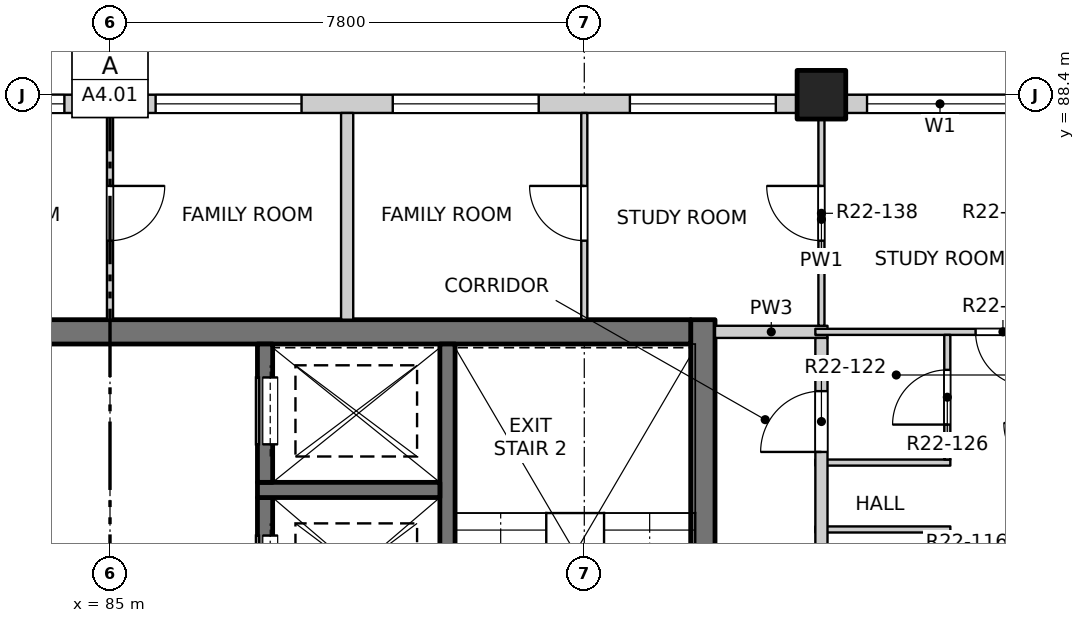
"""IFC4 building model, lengths in metres.
Left out: names, types, materials, properties, quantities, classifications, styles, units other than length and angle.
Written with IfcOpenShell. Run it as: python <this file> out.ifc"""

import sys

from ifc_helpers import new_model, si_unit, direction, frame, frame_2d, origin, origin_2d, place, context, subcontext, project, spatial, rectangle, extrude, element, fill, save


model = new_model("IFC4")
c1 = context("Model", 3, precision=1e-05, world=origin(), true_north=direction((0.0, 1.0)))
c2 = subcontext(c1, "Body", "Model", "MODEL_VIEW")
j1 = project(units=[si_unit("LENGTHUNIT", "METRE"), si_unit("PLANEANGLEUNIT", "RADIAN")], contexts=[c1])
p1 = place(None, origin())
s1 = spatial("IfcSite", under=j1, at=p1, CompositionType="ELEMENT")
p2 = place(p1, origin())
s2 = spatial("IfcBuilding", under=s1, at=p2, CompositionType="ELEMENT")
p3 = place(p2, frame((0.0, 0.0, 224.5)))
s3 = spatial("IfcBuildingStorey", under=s2, at=p3, CompositionType="ELEMENT", Elevation=224.5)
p4 = place(p3, frame((96.7, 88.4, -0.25), z_axis=(0.0, 0.0, 1.0), x_axis=(1.0, 0.0, 0.0)))
e1 = element("IfcColumn", 1, at=p4, inside=s3, PredefinedType="COLUMN", context=c2, shape_type="SweptSolid", body=[
    extrude(rectangle(XDim=0.8, YDim=0.8, at=origin_2d()), origin(), (0.0, 0.0, 1.0), 3.4),
])
p5 = place(p3, frame((94.75, 77.3, -0.25), z_axis=(0.0, 0.0, 1.0), x_axis=(0.0, 1.0, 0.0)))
e2 = element("IfcWall", 2, at=p5, inside=s3, PredefinedType="SOLIDWALL", context=c2, shape_type="SweptSolid", body=[
    extrude(rectangle(XDim=7.4, YDim=0.4, at=frame_2d((3.7, 0.0))), origin(), (0.0, 0.0, 1.0), 3.4),
])
p6 = place(p5, frame((0.3, 0.0, 0.25)))
e3 = element("IfcOpeningElement", 3, at=p6, cuts=e2, PredefinedType="OPENING", context=c2, shape_type="SweptSolid", body=[
    extrude(rectangle(XDim=1.2, YDim=2.1, at=frame_2d((0.6, 1.05))), frame((0.0, 0.21, 0.0), z_axis=(0.0, -1.0, 0.0), x_axis=(1.0, 0.0, 0.0)), (0.0, 0.0, 1.0), 0.42),
])
p7 = place(p3, frame((75.45, 84.5, -0.25), z_axis=(0.0, 0.0, 1.0), x_axis=(1.0, 0.0, 0.0)))
e4 = element("IfcWall", 4, at=p7, inside=s3, PredefinedType="SOLIDWALL", context=c2, shape_type="SweptSolid", body=[
    extrude(rectangle(XDim=19.1, YDim=0.4, at=frame_2d((9.55, 0.0))), origin(), (0.0, 0.0, 1.0), 3.4),
])
p8 = place(p3, frame((90.55, 77.3, -0.25), z_axis=(0.0, 0.0, 1.0), x_axis=(0.0, 1.0, 0.0)))
e5 = element("IfcWall", 5, at=p8, inside=s3, PredefinedType="SOLIDWALL", context=c2, shape_type="SweptSolid", body=[
    extrude(rectangle(XDim=7.0, YDim=0.25, at=frame_2d((3.5, 0.0))), origin(), (0.0, 0.0, 1.0), 3.4),
])
p9 = place(p3, frame((87.55, 79.425, -0.25), z_axis=(0.0, 0.0, 1.0), x_axis=(0.0, 1.0, 0.0)))
e6 = element("IfcWall", 6, at=p9, inside=s3, PredefinedType="SOLIDWALL", context=c2, shape_type="SweptSolid", body=[
    extrude(rectangle(XDim=2.35, YDim=0.25, at=frame_2d((1.175, 0.0))), origin(), (0.0, 0.0, 1.0), 3.4),
])
p10 = place(p9, frame((0.625, 0.0, 0.25)))
e7 = element("IfcOpeningElement", 7, at=p10, cuts=e6, PredefinedType="OPENING", context=c2, shape_type="SweptSolid", body=[
    extrude(rectangle(XDim=1.1, YDim=2.1, at=frame_2d((0.55, 1.05))), frame((0.0, 0.135, 0.0), z_axis=(0.0, -1.0, 0.0), x_axis=(1.0, 0.0, 0.0)), (0.0, 0.0, 1.0), 0.27),
])
p11 = place(p3, frame((87.425, 81.9, -0.25), z_axis=(0.0, 0.0, 1.0), x_axis=(1.0, 0.0, 0.0)))
e8 = element("IfcWall", 8, at=p11, inside=s3, PredefinedType="SOLIDWALL", context=c2, shape_type="SweptSolid", body=[
    extrude(rectangle(XDim=3.0, YDim=0.25, at=frame_2d((1.5, 0.0))), origin(), (0.0, 0.0, 1.0), 3.4),
])
p12 = place(p3, frame((87.55, 82.025, -0.25), z_axis=(0.0, 0.0, 1.0), x_axis=(0.0, 1.0, 0.0)))
e9 = element("IfcWall", 9, at=p12, inside=s3, PredefinedType="SOLIDWALL", context=c2, shape_type="SweptSolid", body=[
    extrude(rectangle(XDim=2.275, YDim=0.25, at=frame_2d((1.138, 0.0))), origin(), (0.0, 0.0, 1.0), 3.4),
])
p13 = place(p12, frame((0.625, 0.0, 0.25)))
e10 = element("IfcOpeningElement", 10, at=p13, cuts=e9, PredefinedType="OPENING", context=c2, shape_type="SweptSolid", body=[
    extrude(rectangle(XDim=1.1, YDim=2.1, at=frame_2d((0.55, 1.05))), frame((0.0, 0.135, 0.0), z_axis=(0.0, -1.0, 0.0), x_axis=(1.0, 0.0, 0.0)), (0.0, 0.0, 1.0), 0.27),
])
p14 = place(p3, frame((73.7, 88.25, 0.0), z_axis=(0.0, 0.0, 1.0), x_axis=(1.0, 0.0, 0.0)))
e11 = element("IfcWall", 11, at=p14, inside=s3, PredefinedType="SOLIDWALL", context=c2, shape_type="SweptSolid", body=[
    extrude(rectangle(XDim=22.6, YDim=0.3, at=frame_2d((11.3, 0.0))), origin(), (0.0, 0.0, 1.0), 2.7),
])
p15 = place(p14, frame((0.35, 0.0, 0.9)))
e12 = element("IfcOpeningElement", 12, at=p15, cuts=e11, PredefinedType="OPENING", context=c2, shape_type="SweptSolid", body=[
    extrude(rectangle(XDim=2.4, YDim=1.8, at=frame_2d((1.2, 0.9))), frame((0.0, 0.16, 0.0), z_axis=(0.0, -1.0, 0.0), x_axis=(1.0, 0.0, 0.0)), (0.0, 0.0, 1.0), 0.32),
])
p16 = place(p14, frame((4.25, 0.0, 0.9)))
e13 = element("IfcOpeningElement", 13, at=p16, cuts=e11, PredefinedType="OPENING", context=c2, shape_type="SweptSolid", body=[
    extrude(rectangle(XDim=2.4, YDim=1.8, at=frame_2d((1.2, 0.9))), frame((0.0, 0.16, 0.0), z_axis=(0.0, -1.0, 0.0), x_axis=(1.0, 0.0, 0.0)), (0.0, 0.0, 1.0), 0.32),
])
p17 = place(p14, frame((8.15, 0.0, 0.9)))
e14 = element("IfcOpeningElement", 14, at=p17, cuts=e11, PredefinedType="OPENING", context=c2, shape_type="SweptSolid", body=[
    extrude(rectangle(XDim=2.4, YDim=1.8, at=frame_2d((1.2, 0.9))), frame((0.0, 0.16, 0.0), z_axis=(0.0, -1.0, 0.0), x_axis=(1.0, 0.0, 0.0)), (0.0, 0.0, 1.0), 0.32),
])
p18 = place(p14, frame((12.05, 0.0, 0.9)))
e15 = element("IfcOpeningElement", 15, at=p18, cuts=e11, PredefinedType="OPENING", context=c2, shape_type="SweptSolid", body=[
    extrude(rectangle(XDim=2.4, YDim=1.8, at=frame_2d((1.2, 0.9))), frame((0.0, 0.16, 0.0), z_axis=(0.0, -1.0, 0.0), x_axis=(1.0, 0.0, 0.0)), (0.0, 0.0, 1.0), 0.32),
])
p19 = place(p14, frame((15.95, 0.0, 0.9)))
e16 = element("IfcOpeningElement", 16, at=p19, cuts=e11, PredefinedType="OPENING", context=c2, shape_type="SweptSolid", body=[
    extrude(rectangle(XDim=2.4, YDim=1.8, at=frame_2d((1.2, 0.9))), frame((0.0, 0.16, 0.0), z_axis=(0.0, -1.0, 0.0), x_axis=(1.0, 0.0, 0.0)), (0.0, 0.0, 1.0), 0.32),
])
p20 = place(p14, frame((19.85, 0.0, 0.9)))
e17 = element("IfcOpeningElement", 17, at=p20, cuts=e11, PredefinedType="OPENING", context=c2, shape_type="SweptSolid", body=[
    extrude(rectangle(XDim=2.4, YDim=1.8, at=frame_2d((1.2, 0.9))), frame((0.0, 0.16, 0.0), z_axis=(0.0, -1.0, 0.0), x_axis=(1.0, 0.0, 0.0)), (0.0, 0.0, 1.0), 0.32),
])
p21 = place(p3, frame((97.1, 88.25, 0.0), z_axis=(0.0, 0.0, 1.0), x_axis=(1.0, 0.0, 0.0)))
e18 = element("IfcWall", 18, at=p21, inside=s3, PredefinedType="SOLIDWALL", context=c2, shape_type="SweptSolid", body=[
    extrude(rectangle(XDim=7.4, YDim=0.3, at=frame_2d((3.7, 0.0))), origin(), (0.0, 0.0, 1.0), 2.7),
])
p22 = place(p21, frame((0.35, 0.0, 0.9)))
e19 = element("IfcOpeningElement", 19, at=p22, cuts=e18, PredefinedType="OPENING", context=c2, shape_type="SweptSolid", body=[
    extrude(rectangle(XDim=2.4, YDim=1.8, at=frame_2d((1.2, 0.9))), frame((0.0, 0.16, 0.0), z_axis=(0.0, -1.0, 0.0), x_axis=(1.0, 0.0, 0.0)), (0.0, 0.0, 1.0), 0.32),
])
p23 = place(p21, frame((4.25, 0.0, 0.9)))
e20 = element("IfcOpeningElement", 20, at=p23, cuts=e18, PredefinedType="OPENING", context=c2, shape_type="SweptSolid", body=[
    extrude(rectangle(XDim=2.4, YDim=1.8, at=frame_2d((1.2, 0.9))), frame((0.0, 0.16, 0.0), z_axis=(0.0, -1.0, 0.0), x_axis=(1.0, 0.0, 0.0)), (0.0, 0.0, 1.0), 0.32),
])
for number, where, z_axis, x_axis in (
    (21, (96.6, 81.25, 0.0), (0.0, 0.0, 1.0), (1.0, 0.0, 0.0)),
    (22, (96.6, 82.35, 0.0), (0.0, 0.0, 1.0), (1.0, 0.0, 0.0)),
):
    element("IfcWall", number, at=place(p3, frame(where, z_axis=z_axis, x_axis=x_axis)), inside=s3, PredefinedType="PARTITIONING", context=c2, shape_type="SweptSolid", body=[
        extrude(rectangle(XDim=2.22, YDim=0.1, at=frame_2d((1.11, 0.0))), origin(), (0.0, 0.0, 1.0), 3.15),
    ])
p24 = place(p3, frame((94.95, 84.5, 0.0), z_axis=(0.0, 0.0, 1.0), x_axis=(1.0, 0.0, 0.0)))
e23 = element("IfcWall", 23, at=p24, inside=s3, PredefinedType="PARTITIONING", context=c2, shape_type="SweptSolid", body=[
    extrude(rectangle(XDim=1.85, YDim=0.2, at=frame_2d((0.925, 0.0))), origin(), (0.0, 0.0, 1.0), 3.15),
])
p25 = place(p3, frame((96.6, 84.5, 0.0), z_axis=(0.0, 0.0, 1.0), x_axis=(1.0, 0.0, 0.0)))
e24 = element("IfcWall", 24, at=p25, inside=s3, PredefinedType="PARTITIONING", context=c2, shape_type="SweptSolid", body=[
    extrude(rectangle(XDim=11.5, YDim=0.1, at=frame_2d((5.75, 0.0))), origin(), (0.0, 0.0, 1.0), 3.15),
])
p26 = place(p25, frame((2.635, 0.0, 0.0)))
e25 = element("IfcOpeningElement", 25, at=p26, cuts=e24, PredefinedType="OPENING", context=c2, shape_type="SweptSolid", body=[
    extrude(rectangle(XDim=0.9, YDim=2.1, at=frame_2d((0.45, 1.05))), frame((0.0, 0.06, 0.0), z_axis=(0.0, -1.0, 0.0), x_axis=(1.0, 0.0, 0.0)), (0.0, 0.0, 1.0), 0.12),
])
p27 = place(p3, frame((85.0, 84.7, 0.0), z_axis=(0.0, 0.0, 1.0), x_axis=(0.0, 1.0, 0.0)))
e26 = element("IfcWall", 26, at=p27, inside=s3, PredefinedType="PARTITIONING", context=c2, shape_type="SweptSolid", body=[
    extrude(rectangle(XDim=3.4, YDim=0.1, at=frame_2d((1.7, 0.0))), origin(), (0.0, 0.0, 1.0), 3.15),
])
p28 = place(p27, frame((1.3, 0.0, 0.0)))
e27 = element("IfcOpeningElement", 27, at=p28, cuts=e26, PredefinedType="OPENING", context=c2, shape_type="SweptSolid", body=[
    extrude(rectangle(XDim=0.9, YDim=2.1, at=frame_2d((0.45, 1.05))), frame((0.0, 0.06, 0.0), z_axis=(0.0, -1.0, 0.0), x_axis=(1.0, 0.0, 0.0)), (0.0, 0.0, 1.0), 0.12),
])
p29 = place(p3, frame((88.9, 84.7, 0.0), z_axis=(0.0, 0.0, 1.0), x_axis=(0.0, 1.0, 0.0)))
e28 = element("IfcWall", 28, at=p29, inside=s3, PredefinedType="PARTITIONING", context=c2, shape_type="SweptSolid", body=[
    extrude(rectangle(XDim=3.4, YDim=0.2, at=frame_2d((1.7, 0.0))), origin(), (0.0, 0.0, 1.0), 3.15),
])
p30 = place(p3, frame((92.8, 84.7, 0.0), z_axis=(0.0, 0.0, 1.0), x_axis=(0.0, 1.0, 0.0)))
e29 = element("IfcWall", 29, at=p30, inside=s3, PredefinedType="PARTITIONING", context=c2, shape_type="SweptSolid", body=[
    extrude(rectangle(XDim=3.4, YDim=0.1, at=frame_2d((1.7, 0.0))), origin(), (0.0, 0.0, 1.0), 3.15),
])
p31 = place(p30, frame((1.3, 0.0, 0.0)))
e30 = element("IfcOpeningElement", 30, at=p31, cuts=e29, PredefinedType="OPENING", context=c2, shape_type="SweptSolid", body=[
    extrude(rectangle(XDim=0.9, YDim=2.1, at=frame_2d((0.45, 1.05))), frame((0.0, 0.06, 0.0), z_axis=(0.0, -1.0, 0.0), x_axis=(1.0, 0.0, 0.0)), (0.0, 0.0, 1.0), 0.12),
])
p32 = place(p3, frame((96.7, 49.5, 0.0), z_axis=(0.0, 0.0, 1.0), x_axis=(0.0, 1.0, 0.0)))
e31 = element("IfcWall", 31, at=p32, inside=s3, PredefinedType="PARTITIONING", context=c2, shape_type="SweptSolid", body=[
    extrude(rectangle(XDim=34.9, YDim=0.2, at=frame_2d((17.45, 0.0))), origin(), (0.0, 0.0, 1.0), 3.15),
])
p33 = place(p32, frame((9.675, 0.0, 0.0)))
e32 = element("IfcOpeningElement", 32, at=p33, cuts=e31, PredefinedType="OPENING", context=c2, shape_type="SweptSolid", body=[
    extrude(rectangle(XDim=1.0, YDim=2.1, at=frame_2d((0.5, 1.05))), frame((0.0, 0.11, 0.0), z_axis=(0.0, -1.0, 0.0), x_axis=(1.0, 0.0, 0.0)), (0.0, 0.0, 1.0), 0.22),
])
p34 = place(p32, frame((22.925, 0.0, 0.0)))
e33 = element("IfcOpeningElement", 33, at=p34, cuts=e31, PredefinedType="OPENING", context=c2, shape_type="SweptSolid", body=[
    extrude(rectangle(XDim=1.0, YDim=2.1, at=frame_2d((0.5, 1.05))), frame((0.0, 0.11, 0.0), z_axis=(0.0, -1.0, 0.0), x_axis=(1.0, 0.0, 0.0)), (0.0, 0.0, 1.0), 0.22),
])
p35 = place(p32, frame((33.025, 0.0, 0.0)))
e34 = element("IfcOpeningElement", 34, at=p35, cuts=e31, PredefinedType="OPENING", context=c2, shape_type="SweptSolid", body=[
    extrude(rectangle(XDim=1.0, YDim=2.1, at=frame_2d((0.5, 1.05))), frame((0.0, 0.11, 0.0), z_axis=(0.0, -1.0, 0.0), x_axis=(1.0, 0.0, 0.0)), (0.0, 0.0, 1.0), 0.22),
])
p36 = place(p3, frame((96.7, 84.6, 0.0), z_axis=(0.0, 0.0, 1.0), x_axis=(0.0, 1.0, 0.0)))
e35 = element("IfcWall", 35, at=p36, inside=s3, PredefinedType="PARTITIONING", context=c2, shape_type="SweptSolid", body=[
    extrude(rectangle(XDim=3.5, YDim=0.1, at=frame_2d((1.75, 0.0))), origin(), (0.0, 0.0, 1.0), 3.15),
])
p37 = place(p36, frame((1.4, 0.0, 0.0)))
e36 = element("IfcOpeningElement", 36, at=p37, cuts=e35, PredefinedType="OPENING", context=c2, shape_type="SweptSolid", body=[
    extrude(rectangle(XDim=0.9, YDim=2.1, at=frame_2d((0.45, 1.05))), frame((0.0, 0.06, 0.0), z_axis=(0.0, -1.0, 0.0), x_axis=(1.0, 0.0, 0.0)), (0.0, 0.0, 1.0), 0.12),
])
p38 = place(p3, frame((98.77, 72.3, 0.0), z_axis=(0.0, 0.0, 1.0), x_axis=(0.0, 1.0, 0.0)))
e37 = element("IfcWall", 37, at=p38, inside=s3, PredefinedType="PARTITIONING", context=c2, shape_type="SweptSolid", body=[
    extrude(rectangle(XDim=8.9, YDim=0.1, at=frame_2d((4.45, 0.0))), origin(), (0.0, 0.0, 1.0), 3.15),
])
p39 = place(p38, frame((0.54, 0.0, 0.0)))
e38 = element("IfcOpeningElement", 38, at=p39, cuts=e37, PredefinedType="OPENING", context=c2, shape_type="SweptSolid", body=[
    extrude(rectangle(XDim=0.8, YDim=2.1, at=frame_2d((0.4, 1.05))), frame((0.0, 0.06, 0.0), z_axis=(0.0, -1.0, 0.0), x_axis=(1.0, 0.0, 0.0)), (0.0, 0.0, 1.0), 0.12),
])
p40 = place(p38, frame((2.715, 0.0, 0.0)))
e39 = element("IfcOpeningElement", 39, at=p40, cuts=e37, PredefinedType="OPENING", context=c2, shape_type="SweptSolid", body=[
    extrude(rectangle(XDim=0.9, YDim=2.1, at=frame_2d((0.45, 1.05))), frame((0.0, 0.06, 0.0), z_axis=(0.0, -1.0, 0.0), x_axis=(1.0, 0.0, 0.0)), (0.0, 0.0, 1.0), 0.12),
])
p41 = place(p38, frame((5.3, 0.0, 0.0)))
e40 = element("IfcOpeningElement", 40, at=p41, cuts=e37, PredefinedType="OPENING", context=c2, shape_type="SweptSolid", body=[
    extrude(rectangle(XDim=0.9, YDim=2.1, at=frame_2d((0.45, 1.05))), frame((0.0, 0.06, 0.0), z_axis=(0.0, -1.0, 0.0), x_axis=(1.0, 0.0, 0.0)), (0.0, 0.0, 1.0), 0.12),
])
p42 = place(p38, frame((7.625, 0.0, 0.0)))
e41 = element("IfcOpeningElement", 41, at=p42, cuts=e37, PredefinedType="OPENING", context=c2, shape_type="SweptSolid", body=[
    extrude(rectangle(XDim=0.8, YDim=2.1, at=frame_2d((0.4, 1.05))), frame((0.0, 0.06, 0.0), z_axis=(0.0, -1.0, 0.0), x_axis=(1.0, 0.0, 0.0)), (0.0, 0.0, 1.0), 0.12),
])
p43 = place(p3, frame((98.77, 82.4, 0.0), z_axis=(0.0, 0.0, 1.0), x_axis=(0.0, 1.0, 0.0)))
e42 = element("IfcWall", 42, at=p43, inside=s3, PredefinedType="PARTITIONING", context=c2, shape_type="SweptSolid", body=[
    extrude(rectangle(XDim=2.05, YDim=0.1, at=frame_2d((1.025, 0.0))), origin(), (0.0, 0.0, 1.0), 3.15),
])
p44 = place(p43, frame((0.575, 0.0, 0.0)))
e43 = element("IfcOpeningElement", 43, at=p44, cuts=e42, PredefinedType="OPENING", context=c2, shape_type="SweptSolid", body=[
    extrude(rectangle(XDim=0.9, YDim=2.1, at=frame_2d((0.45, 1.05))), frame((0.0, 0.06, 0.0), z_axis=(0.0, -1.0, 0.0), x_axis=(1.0, 0.0, 0.0)), (0.0, 0.0, 1.0), 0.12),
])
p45 = place(p17, origin())
e44 = element("IfcWindow", 44, at=p45, inside=s3, PartitioningType="DOUBLE_PANEL_VERTICAL", PredefinedType="WINDOW", context=c2, shape_type="SweptSolid", body=[
    extrude(rectangle(XDim=2.4, YDim=1.8, at=frame_2d((1.2, 0.9))), frame((0.0, 0.03, 0.0), z_axis=(0.0, -1.0, 0.0), x_axis=(1.0, 0.0, 0.0)), (0.0, 0.0, 1.0), 0.06),
])
fill(e14, e44)
p46 = place(p18, origin())
e45 = element("IfcWindow", 45, at=p46, inside=s3, PartitioningType="DOUBLE_PANEL_VERTICAL", PredefinedType="WINDOW", context=c2, shape_type="SweptSolid", body=[
    extrude(rectangle(XDim=2.4, YDim=1.8, at=frame_2d((1.2, 0.9))), frame((0.0, 0.03, 0.0), z_axis=(0.0, -1.0, 0.0), x_axis=(1.0, 0.0, 0.0)), (0.0, 0.0, 1.0), 0.06),
])
fill(e15, e45)
p47 = place(p19, origin())
e46 = element("IfcWindow", 46, at=p47, inside=s3, PartitioningType="DOUBLE_PANEL_VERTICAL", PredefinedType="WINDOW", context=c2, shape_type="SweptSolid", body=[
    extrude(rectangle(XDim=2.4, YDim=1.8, at=frame_2d((1.2, 0.9))), frame((0.0, 0.03, 0.0), z_axis=(0.0, -1.0, 0.0), x_axis=(1.0, 0.0, 0.0)), (0.0, 0.0, 1.0), 0.06),
])
fill(e16, e46)
p48 = place(p20, origin())
e47 = element("IfcWindow", 47, at=p48, inside=s3, PartitioningType="DOUBLE_PANEL_VERTICAL", PredefinedType="WINDOW", context=c2, shape_type="SweptSolid", body=[
    extrude(rectangle(XDim=2.4, YDim=1.8, at=frame_2d((1.2, 0.9))), frame((0.0, 0.03, 0.0), z_axis=(0.0, -1.0, 0.0), x_axis=(1.0, 0.0, 0.0)), (0.0, 0.0, 1.0), 0.06),
])
fill(e17, e47)
p49 = place(p22, origin())
e48 = element("IfcWindow", 48, at=p49, inside=s3, PartitioningType="DOUBLE_PANEL_VERTICAL", PredefinedType="WINDOW", context=c2, shape_type="SweptSolid", body=[
    extrude(rectangle(XDim=2.4, YDim=1.8, at=frame_2d((1.2, 0.9))), frame((0.0, 0.03, 0.0), z_axis=(0.0, -1.0, 0.0), x_axis=(1.0, 0.0, 0.0)), (0.0, 0.0, 1.0), 0.06),
])
fill(e19, e48)
p50 = place(p10, origin())
e49 = element("IfcDoor", 49, at=p50, inside=s3, OperationType="SLIDING_TO_RIGHT", PredefinedType="DOOR", context=c2, shape_type="SweptSolid", body=[
    extrude(rectangle(XDim=1.1, YDim=2.1, at=frame_2d((0.55, 1.05))), frame((0.0, -0.06, 0.0), z_axis=(0.0, -1.0, 0.0), x_axis=(1.0, 0.0, 0.0)), (0.0, 0.0, 1.0), 0.05),
])
fill(e7, e49)
p51 = place(p35, origin())
e50 = element("IfcDoor", 50, at=p51, inside=s3, OperationType="SINGLE_SWING_LEFT", PredefinedType="DOOR", context=c2, shape_type="SweptSolid", body=[
    extrude(rectangle(XDim=1.0, YDim=2.1, at=frame_2d((0.5, 1.05))), frame((0.0, 0.025, 0.0), z_axis=(0.0, -1.0, 0.0), x_axis=(1.0, 0.0, 0.0)), (0.0, 0.0, 1.0), 0.05),
])
fill(e34, e50)
p52 = place(p13, origin())
e51 = element("IfcDoor", 51, at=p52, inside=s3, OperationType="SLIDING_TO_RIGHT", PredefinedType="DOOR", context=c2, shape_type="SweptSolid", body=[
    extrude(rectangle(XDim=1.1, YDim=2.1, at=frame_2d((0.55, 1.05))), frame((0.0, -0.06, 0.0), z_axis=(0.0, -1.0, 0.0), x_axis=(1.0, 0.0, 0.0)), (0.0, 0.0, 1.0), 0.05),
])
fill(e10, e51)
p53 = place(p44, origin())
e52 = element("IfcDoor", 52, at=p53, inside=s3, OperationType="SINGLE_SWING_LEFT", PredefinedType="DOOR", context=c2, shape_type="SweptSolid", body=[
    extrude(rectangle(XDim=0.9, YDim=2.1, at=frame_2d((0.45, 1.05))), frame((0.0, 0.025, 0.0), z_axis=(0.0, -1.0, 0.0), x_axis=(1.0, 0.0, 0.0)), (0.0, 0.0, 1.0), 0.05),
])
fill(e43, e52)
p54 = place(p26, origin())
e53 = element("IfcDoor", 53, at=p54, inside=s3, OperationType="SINGLE_SWING_LEFT", PredefinedType="DOOR", context=c2, shape_type="SweptSolid", body=[
    extrude(rectangle(XDim=0.9, YDim=2.1, at=frame_2d((0.45, 1.05))), frame((0.0, 0.025, 0.0), z_axis=(0.0, -1.0, 0.0), x_axis=(1.0, 0.0, 0.0)), (0.0, 0.0, 1.0), 0.05),
])
fill(e25, e53)
p55 = place(p28, origin())
e54 = element("IfcDoor", 54, at=p55, inside=s3, OperationType="SINGLE_SWING_LEFT", PredefinedType="DOOR", context=c2, shape_type="SweptSolid", body=[
    extrude(rectangle(XDim=0.9, YDim=2.1, at=frame_2d((0.45, 1.05))), frame((0.0, 0.025, 0.0), z_axis=(0.0, -1.0, 0.0), x_axis=(1.0, 0.0, 0.0)), (0.0, 0.0, 1.0), 0.05),
])
fill(e27, e54)
p56 = place(p31, origin())
e55 = element("IfcDoor", 55, at=p56, inside=s3, OperationType="SINGLE_SWING_RIGHT", PredefinedType="DOOR", context=c2, shape_type="SweptSolid", body=[
    extrude(rectangle(XDim=0.9, YDim=2.1, at=frame_2d((0.45, 1.05))), frame((0.0, 0.025, 0.0), z_axis=(0.0, -1.0, 0.0), x_axis=(1.0, 0.0, 0.0)), (0.0, 0.0, 1.0), 0.05),
])
fill(e30, e55)
p57 = place(p37, origin())
e56 = element("IfcDoor", 56, at=p57, inside=s3, OperationType="SINGLE_SWING_RIGHT", PredefinedType="DOOR", context=c2, shape_type="SweptSolid", body=[
    extrude(rectangle(XDim=0.9, YDim=2.1, at=frame_2d((0.45, 1.05))), frame((0.0, 0.025, 0.0), z_axis=(0.0, -1.0, 0.0), x_axis=(1.0, 0.0, 0.0)), (0.0, 0.0, 1.0), 0.05),
])
fill(e36, e56)
save(model, sys.argv[1])
